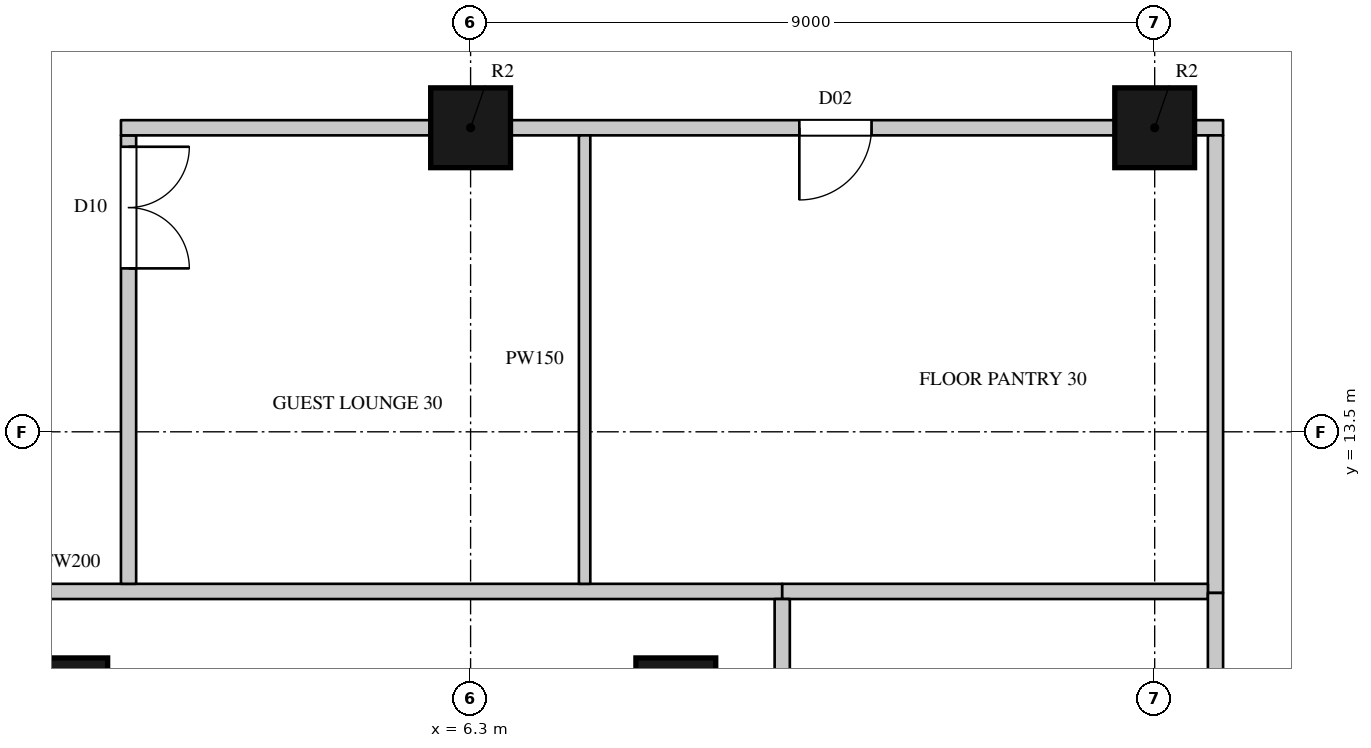
"""IFC4 building model, lengths in metres.
Left out: names, types, materials, properties, quantities, classifications, styles, units other than length and angle.
Written with IfcOpenShell. Run it as: python <this file> out.ifc"""

import sys

from ifc_helpers import new_model, si_unit, direction, frame, frame_2d, origin, origin_2d, place, context, subcontext, project, spatial, rectangle, circle, extrude, element, fill, save


model = new_model("IFC4")
c1 = context("Model", 3, precision=1e-05, world=origin(), true_north=direction((0.0, 1.0)))
c2 = subcontext(c1, "Body", "Model", "MODEL_VIEW")
j1 = project(units=[si_unit("LENGTHUNIT", "METRE"), si_unit("PLANEANGLEUNIT", "RADIAN")], contexts=[c1])
p1 = place(None, origin())
s1 = spatial("IfcSite", under=j1, at=p1, CompositionType="ELEMENT")
p2 = place(p1, origin())
s2 = spatial("IfcBuilding", under=s1, at=p2, CompositionType="ELEMENT")
p3 = place(p2, frame((0.0, 0.0, 138.3)))
s3 = spatial("IfcBuildingStorey", under=s2, at=p3, CompositionType="ELEMENT", Elevation=138.3)
for number, where, z_axis, x_axis in (
    (1, (6.3, 17.5, 0.0), (0.0, 0.0, 1.0), (1.0, 0.0, 0.0)),
    (2, (15.3, 17.5, 0.0), (0.0, 0.0, 1.0), (1.0, 0.0, 0.0)),
    (3, (1.0, 10.0, 0.0), (0.0, 0.0, 1.0), (1.0, 0.0, 0.0)),
    (4, (9.0, 10.0, 0.0), (0.0, 0.0, 1.0), (1.0, 0.0, 0.0)),
):
    element("IfcColumn", number, at=place(p3, frame(where, z_axis=z_axis, x_axis=x_axis)), inside=s3, PredefinedType="COLUMN", context=c2, shape_type="SweptSolid", body=[
        extrude(circle(Radius=0.525, at=origin_2d()), origin(), (0.0, 0.0, 1.0), 3.6),
    ])
p4 = place(p3, frame((-8.3, 11.4, 0.0), z_axis=(0.0, 0.0, 1.0), x_axis=(1.0, 0.0, 0.0)))
e5 = element("IfcWall", 5, at=p4, inside=s3, PredefinedType="PARTITIONING", context=c2, shape_type="SweptSolid", body=[
    extrude(rectangle(XDim=18.7, YDim=0.2, at=frame_2d((9.35, 0.0))), origin(), (0.0, 0.0, 1.0), 3.3),
])
p5 = place(p4, frame((6.9, 0.0, 0.0)))
e6 = element("IfcOpeningElement", 6, at=p5, cuts=e5, PredefinedType="OPENING", context=c2, shape_type="SweptSolid", body=[
    extrude(rectangle(XDim=1.5, YDim=2.2, at=frame_2d((0.75, 1.1))), frame((0.0, 0.11, 0.0), z_axis=(0.0, -1.0, 0.0), x_axis=(1.0, 0.0, 0.0)), (0.0, 0.0, 1.0), 0.22),
])
p6 = place(p3, frame((1.8, 11.5, 0.0), z_axis=(0.0, 0.0, 1.0), x_axis=(0.0, 1.0, 0.0)))
e7 = element("IfcWall", 7, at=p6, inside=s3, PredefinedType="PARTITIONING", context=c2, shape_type="SweptSolid", body=[
    extrude(rectangle(XDim=5.9, YDim=0.2, at=frame_2d((2.95, 0.0))), origin(), (0.0, 0.0, 1.0), 3.3),
])
p7 = place(p6, frame((4.15, 0.0, 0.0)))
e8 = element("IfcOpeningElement", 8, at=p7, cuts=e7, PredefinedType="OPENING", context=c2, shape_type="SweptSolid", body=[
    extrude(rectangle(XDim=1.6, YDim=2.4, at=frame_2d((0.8, 1.2))), frame((0.0, 0.11, 0.0), z_axis=(0.0, -1.0, 0.0), x_axis=(1.0, 0.0, 0.0)), (0.0, 0.0, 1.0), 0.22),
])
p8 = place(p3, frame((1.7, 17.5, 0.0), z_axis=(0.0, 0.0, 1.0), x_axis=(1.0, 0.0, 0.0)))
e9 = element("IfcWall", 9, at=p8, inside=s3, PredefinedType="PARTITIONING", context=c2, shape_type="SweptSolid", body=[
    extrude(rectangle(XDim=4.075, YDim=0.2, at=frame_2d((2.038, 0.0))), origin(), (0.0, 0.0, 1.0), 2.75),
])
p9 = place(p3, frame((6.825, 17.5, 0.0), z_axis=(0.0, 0.0, 1.0), x_axis=(1.0, 0.0, 0.0)))
e10 = element("IfcWall", 10, at=p9, inside=s3, PredefinedType="PARTITIONING", context=c2, shape_type="SweptSolid", body=[
    extrude(rectangle(XDim=7.95, YDim=0.2, at=frame_2d((3.975, 0.0))), origin(), (0.0, 0.0, 1.0), 2.75),
])
p10 = place(p9, frame((3.8, 0.0, 0.0)))
e11 = element("IfcOpeningElement", 11, at=p10, cuts=e10, PredefinedType="OPENING", context=c2, shape_type="SweptSolid", body=[
    extrude(rectangle(XDim=0.95, YDim=2.2, at=frame_2d((0.475, 1.1))), frame((0.0, 0.11, 0.0), z_axis=(0.0, -1.0, 0.0), x_axis=(1.0, 0.0, 0.0)), (0.0, 0.0, 1.0), 0.22),
])
p11 = place(p3, frame((15.825, 17.5, 0.0), z_axis=(0.0, 0.0, 1.0), x_axis=(1.0, 0.0, 0.0)))
e12 = element("IfcWall", 12, at=p11, inside=s3, PredefinedType="PARTITIONING", context=c2, shape_type="SweptSolid", body=[
    extrude(rectangle(XDim=0.375, YDim=0.2, at=frame_2d((0.188, 0.0))), origin(), (0.0, 0.0, 1.0), 3.3),
])
p12 = place(p3, frame((16.1, 11.38, 0.0), z_axis=(0.0, 0.0, 1.0), x_axis=(0.0, 1.0, 0.0)))
e13 = element("IfcWall", 13, at=p12, inside=s3, PredefinedType="PARTITIONING", context=c2, shape_type="SweptSolid", body=[
    extrude(rectangle(XDim=6.02, YDim=0.2, at=frame_2d((3.01, 0.0))), origin(), (0.0, 0.0, 1.0), 3.3),
])
p13 = place(p3, frame((7.8, 11.5, 0.0), z_axis=(0.0, 0.0, 1.0), x_axis=(0.0, 1.0, 0.0)))
e14 = element("IfcWall", 14, at=p13, inside=s3, PredefinedType="PARTITIONING", context=c2, shape_type="SweptSolid", body=[
    extrude(rectangle(XDim=5.9, YDim=0.15, at=frame_2d((2.95, 0.0))), origin(), (0.0, 0.0, 1.0), 3.3),
])
p14 = place(p3, frame((10.4, 11.4, 0.0), z_axis=(0.0, 0.0, 1.0), x_axis=(1.0, 0.0, 0.0)))
e15 = element("IfcWall", 15, at=p14, inside=s3, PredefinedType="PARTITIONING", context=c2, shape_type="SweptSolid", body=[
    extrude(rectangle(XDim=5.6, YDim=0.2, at=frame_2d((2.8, 0.0))), origin(), (0.0, 0.0, 1.0), 3.3),
])
for number, where, z_axis, x_axis in (
    (16, (10.4, 6.745, 0.0), (0.0, 0.0, 1.0), (0.0, 1.0, 0.0)),
    (17, (16.1, 6.825, 0.0), (0.0, 0.0, 1.0), (0.0, 1.0, 0.0)),
):
    element("IfcWall", number, at=place(p3, frame(where, z_axis=z_axis, x_axis=x_axis)), inside=s3, PredefinedType="PARTITIONING", context=c2, shape_type="SweptSolid", body=[
        extrude(rectangle(XDim=4.555, YDim=0.2, at=frame_2d((2.277, 0.0))), origin(), (0.0, 0.0, 1.0), 3.3),
    ])
p15 = place(p7, origin())
e18 = element("IfcDoor", 18, at=p15, inside=s3, OperationType="DOUBLE_DOOR_SINGLE_SWING", PredefinedType="DOOR", context=c2, shape_type="SweptSolid", body=[
    extrude(rectangle(XDim=1.6, YDim=2.4, at=frame_2d((0.8, 1.2))), frame((0.0, 0.025, 0.0), z_axis=(0.0, -1.0, 0.0), x_axis=(1.0, 0.0, 0.0)), (0.0, 0.0, 1.0), 0.05),
])
fill(e8, e18)
p16 = place(p10, origin())
e19 = element("IfcDoor", 19, at=p16, inside=s3, OperationType="SINGLE_SWING_RIGHT", PredefinedType="DOOR", context=c2, shape_type="SweptSolid", body=[
    extrude(rectangle(XDim=0.95, YDim=2.2, at=frame_2d((0.475, 1.1))), frame((0.0, 0.025, 0.0), z_axis=(0.0, -1.0, 0.0), x_axis=(1.0, 0.0, 0.0)), (0.0, 0.0, 1.0), 0.05),
])
fill(e11, e19)
save(model, sys.argv[1])
